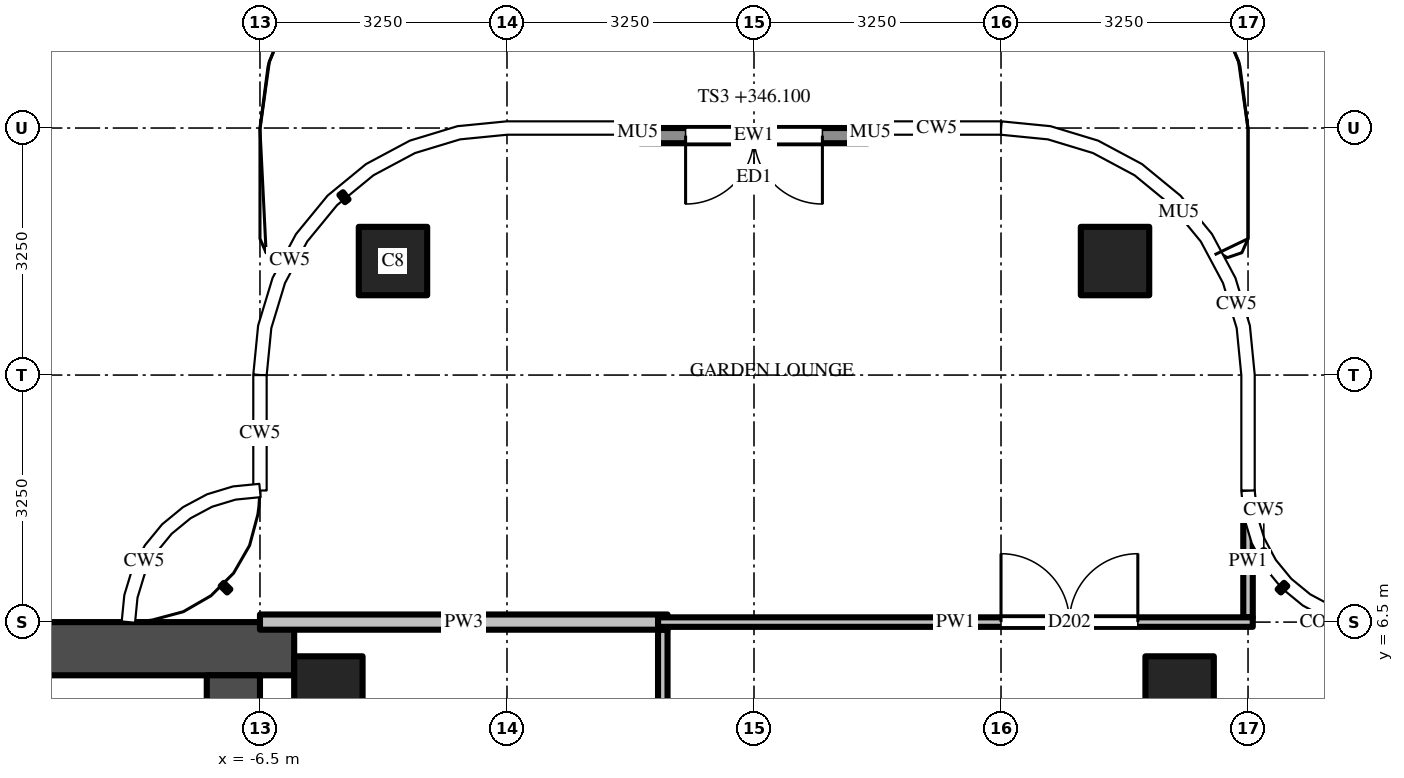
"""IFC4 building model, lengths in metres.
Left out: names, types, materials, properties, quantities, classifications, styles, units other than length and angle.
Written with IfcOpenShell. Run it as: python <this file> out.ifc"""

import sys

from ifc_helpers import new_model, si_unit, direction, frame, frame_2d, origin, origin_2d, place, context, subcontext, project, spatial, rectangle, extrude, source, transform, mapped, element, fill, save


model = new_model("IFC4")
c1 = context("Model", 3, precision=1e-05, world=origin(), true_north=direction((0.0, 1.0)))
c2 = subcontext(c1, "Body", "Model", "MODEL_VIEW")
j1 = project(units=[si_unit("LENGTHUNIT", "METRE"), si_unit("PLANEANGLEUNIT", "RADIAN")], contexts=[c1])
p1 = place(None, origin())
s1 = spatial("IfcSite", under=j1, at=p1, CompositionType="ELEMENT")
p2 = place(p1, origin())
s2 = spatial("IfcBuilding", under=s1, at=p2, CompositionType="ELEMENT")
p3 = place(p2, frame((0.0, 0.0, 346.1)))
s3 = spatial("IfcBuildingStorey", under=s2, at=p3, CompositionType="ELEMENT", Elevation=346.1)
m1 = source(origin(), c2, "Body", "SweptSolid", [
    extrude(rectangle(XDim=0.9, YDim=0.9, at=origin_2d()), origin(), (0.0, 0.0, 1.0), 4.0),
])
for number, where, z_axis, x_axis in (
    (1, (-4.75, 11.25, 0.0), (0.0, 0.0, 1.0), (1.0, 0.0, 0.0)),
    (2, (4.75, 11.25, 0.0), (0.0, 0.0, 1.0), (1.0, 0.0, 0.0)),
    (3, (5.6, 5.6, 0.0), (0.0, 0.0, 1.0), (1.0, 0.0, 0.0)),
    (4, (-5.6, 5.6, 0.0), (0.0, 0.0, 1.0), (1.0, 0.0, 0.0)),
):
    element("IfcColumn", number, at=place(p3, frame(where, z_axis=z_axis, x_axis=x_axis)), inside=s3, PredefinedType="COLUMN", context=c2, shape_type="MappedRepresentation", body=[
        mapped(m1, transform((0.0, 0.0, 0.0))),
    ])
m2 = source(origin(), c2, "Body", "SweptSolid", [
    extrude(rectangle(XDim=16.7, YDim=0.7, at=frame_2d((8.35, 0.0))), origin(), (0.0, 0.0, 1.0), 3.75),
])
p4 = place(p3, frame((-6.05, 6.15, 0.0), z_axis=(0.0, 0.0, 1.0), x_axis=(-1.0, 0.0, 0.0)))
e5 = element("IfcWall", 5, at=p4, inside=s3, PredefinedType="SHEAR", context=c2, shape_type="MappedRepresentation", body=[
    mapped(m2, transform((0.0, 0.0, 0.0))),
])
m3 = source(origin(), c2, "Body", "SweptSolid", [
    extrude(rectangle(XDim=9.05, YDim=0.7, at=frame_2d((4.525, 0.0))), origin(), (0.0, 0.0, 1.0), 3.75),
])
p5 = place(p3, frame((-6.85, 5.8, 0.0), z_axis=(0.0, 0.0, 1.0), x_axis=(0.0, -1.0, 0.0)))
e6 = element("IfcWall", 6, at=p5, inside=s3, PredefinedType="SHEAR", context=c2, shape_type="MappedRepresentation", body=[
    mapped(m3, transform((0.0, 0.0, 0.0))),
])
m4 = source(origin(), c2, "Body", "SweptSolid", [
    extrude(rectangle(XDim=1.8, YDim=2.1, at=frame_2d((0.9, 1.05))), frame((0.0, 0.36, 0.0), z_axis=(0.0, -1.0, 0.0), x_axis=(1.0, 0.0, 0.0)), (0.0, 0.0, 1.0), 0.72),
])
p6 = place(p5, frame((3.15, 0.0, 0.0)))
e7 = element("IfcOpeningElement", 7, at=p6, cuts=e6, PredefinedType="OPENING", context=c2, shape_type="MappedRepresentation", body=[
    mapped(m4, transform((0.0, 0.0, 0.0))),
])
m5 = source(origin(), c2, "Body", "SweptSolid", [
    extrude(rectangle(XDim=3.0, YDim=0.2, at=frame_2d((1.5, 0.0))), origin(), (0.0, 0.0, 1.0), 3.75),
])
p7 = place(p3, frame((1.5, 12.9, 0.0), z_axis=(0.0, 0.0, 1.0), x_axis=(-1.0, 0.0, 0.0)))
e8 = element("IfcWall", 8, at=p7, inside=s3, PredefinedType="SOLIDWALL", context=c2, shape_type="MappedRepresentation", body=[
    mapped(m5, transform((0.0, 0.0, 0.0))),
])
m6 = source(origin(), c2, "Body", "SweptSolid", [
    extrude(rectangle(XDim=1.8, YDim=2.4, at=frame_2d((0.9, 1.2))), frame((0.0, 0.11, 0.0), z_axis=(0.0, -1.0, 0.0), x_axis=(1.0, 0.0, 0.0)), (0.0, 0.0, 1.0), 0.22),
])
p8 = place(p7, frame((0.6, 0.0, 0.0)))
e9 = element("IfcOpeningElement", 9, at=p8, cuts=e8, PredefinedType="OPENING", context=c2, shape_type="MappedRepresentation", body=[
    mapped(m6, transform((0.0, 0.0, 0.0))),
])
m7 = source(origin(), c2, "Body", "SweptSolid", [
    extrude(rectangle(XDim=3.087, YDim=0.125, at=frame_2d((1.544, 0.0))), origin(), (0.0, 0.0, 1.0), 3.046),
])
p9 = place(p3, frame((-1.2, 6.4, 0.0), z_axis=(0.0, 0.0, 1.0), x_axis=(0.0, -1.0, 0.0)))
e10 = element("IfcWall", 10, at=p9, inside=s3, PredefinedType="PARTITIONING", context=c2, shape_type="MappedRepresentation", body=[
    mapped(m7, transform((0.0, 0.0, 0.0))),
])
m8 = source(origin(), c2, "Body", "SweptSolid", [
    extrude(rectangle(XDim=1.469, YDim=0.125, at=frame_2d((0.734, 0.0))), origin(), (0.0, 0.0, 1.0), 3.75),
])
p10 = place(p3, frame((6.5, 6.562, 0.0), z_axis=(0.0, 0.0, 1.0), x_axis=(0.0, 1.0, 0.0)))
e11 = element("IfcWall", 11, at=p10, inside=s3, PredefinedType="PARTITIONING", context=c2, shape_type="MappedRepresentation", body=[
    mapped(m8, transform((0.0, 0.0, 0.0))),
])
m9 = source(origin(), c2, "Body", "SweptSolid", [
    extrude(rectangle(XDim=5.363, YDim=0.2, at=frame_2d((2.681, 0.0))), origin(), (0.0, 0.0, 1.0), 2.83),
])
p11 = place(p3, frame((-6.5, 6.5, 0.0), z_axis=(0.0, 0.0, 1.0), x_axis=(1.0, 0.0, 0.0)))
e12 = element("IfcWall", 12, at=p11, inside=s3, PredefinedType="PARTITIONING", context=c2, shape_type="MappedRepresentation", body=[
    mapped(m9, transform((0.0, 0.0, 0.0))),
])
m10 = source(origin(), c2, "Body", "SweptSolid", [
    extrude(rectangle(XDim=7.825, YDim=0.125, at=frame_2d((3.913, 0.0))), origin(), (0.0, 0.0, 1.0), 2.83),
])
p12 = place(p3, frame((-1.262, 6.5, 0.0), z_axis=(0.0, 0.0, 1.0), x_axis=(1.0, 0.0, 0.0)))
e13 = element("IfcWall", 13, at=p12, inside=s3, PredefinedType="PARTITIONING", context=c2, shape_type="MappedRepresentation", body=[
    mapped(m10, transform((0.0, 0.0, 0.0))),
])
m11 = source(origin(), c2, "Body", "SweptSolid", [
    extrude(rectangle(XDim=1.8, YDim=2.1, at=frame_2d((0.9, 1.05))), frame((0.0, 0.073, 0.0), z_axis=(0.0, -1.0, 0.0), x_axis=(1.0, 0.0, 0.0)), (0.0, 0.0, 1.0), 0.145),
])
p13 = place(p12, frame((4.512, 0.0, 0.0)))
e14 = element("IfcOpeningElement", 14, at=p13, cuts=e13, PredefinedType="OPENING", context=c2, shape_type="MappedRepresentation", body=[
    mapped(m11, transform((0.0, 0.0, 0.0))),
])
m12 = source(origin(), c2, "Body", "SweptSolid", [
    extrude(rectangle(XDim=1.8, YDim=2.4, at=frame_2d((0.9, 1.2))), frame((0.0, 0.025, 0.0), z_axis=(0.0, -1.0, 0.0), x_axis=(1.0, 0.0, 0.0)), (0.0, 0.0, 1.0), 0.05),
])
p14 = place(p8, origin())
e15 = element("IfcDoor", 15, at=p14, inside=s3, OperationType="DOUBLE_DOOR_SINGLE_SWING", PredefinedType="DOOR", context=c2, shape_type="MappedRepresentation", body=[
    mapped(m12, transform((0.0, 0.0, 0.0))),
])
fill(e9, e15)
m13 = source(origin(), c2, "Body", "SweptSolid", [
    extrude(rectangle(XDim=1.8, YDim=2.1, at=frame_2d((0.9, 1.05))), frame((0.0, 0.025, 0.0), z_axis=(0.0, -1.0, 0.0), x_axis=(1.0, 0.0, 0.0)), (0.0, 0.0, 1.0), 0.05),
])
p15 = place(p13, origin())
e16 = element("IfcDoor", 16, at=p15, inside=s3, OperationType="DOUBLE_DOOR_SINGLE_SWING", PredefinedType="DOOR", context=c2, shape_type="MappedRepresentation", body=[
    mapped(m13, transform((0.0, 0.0, 0.0))),
])
fill(e14, e16)
save(model, sys.argv[1])
